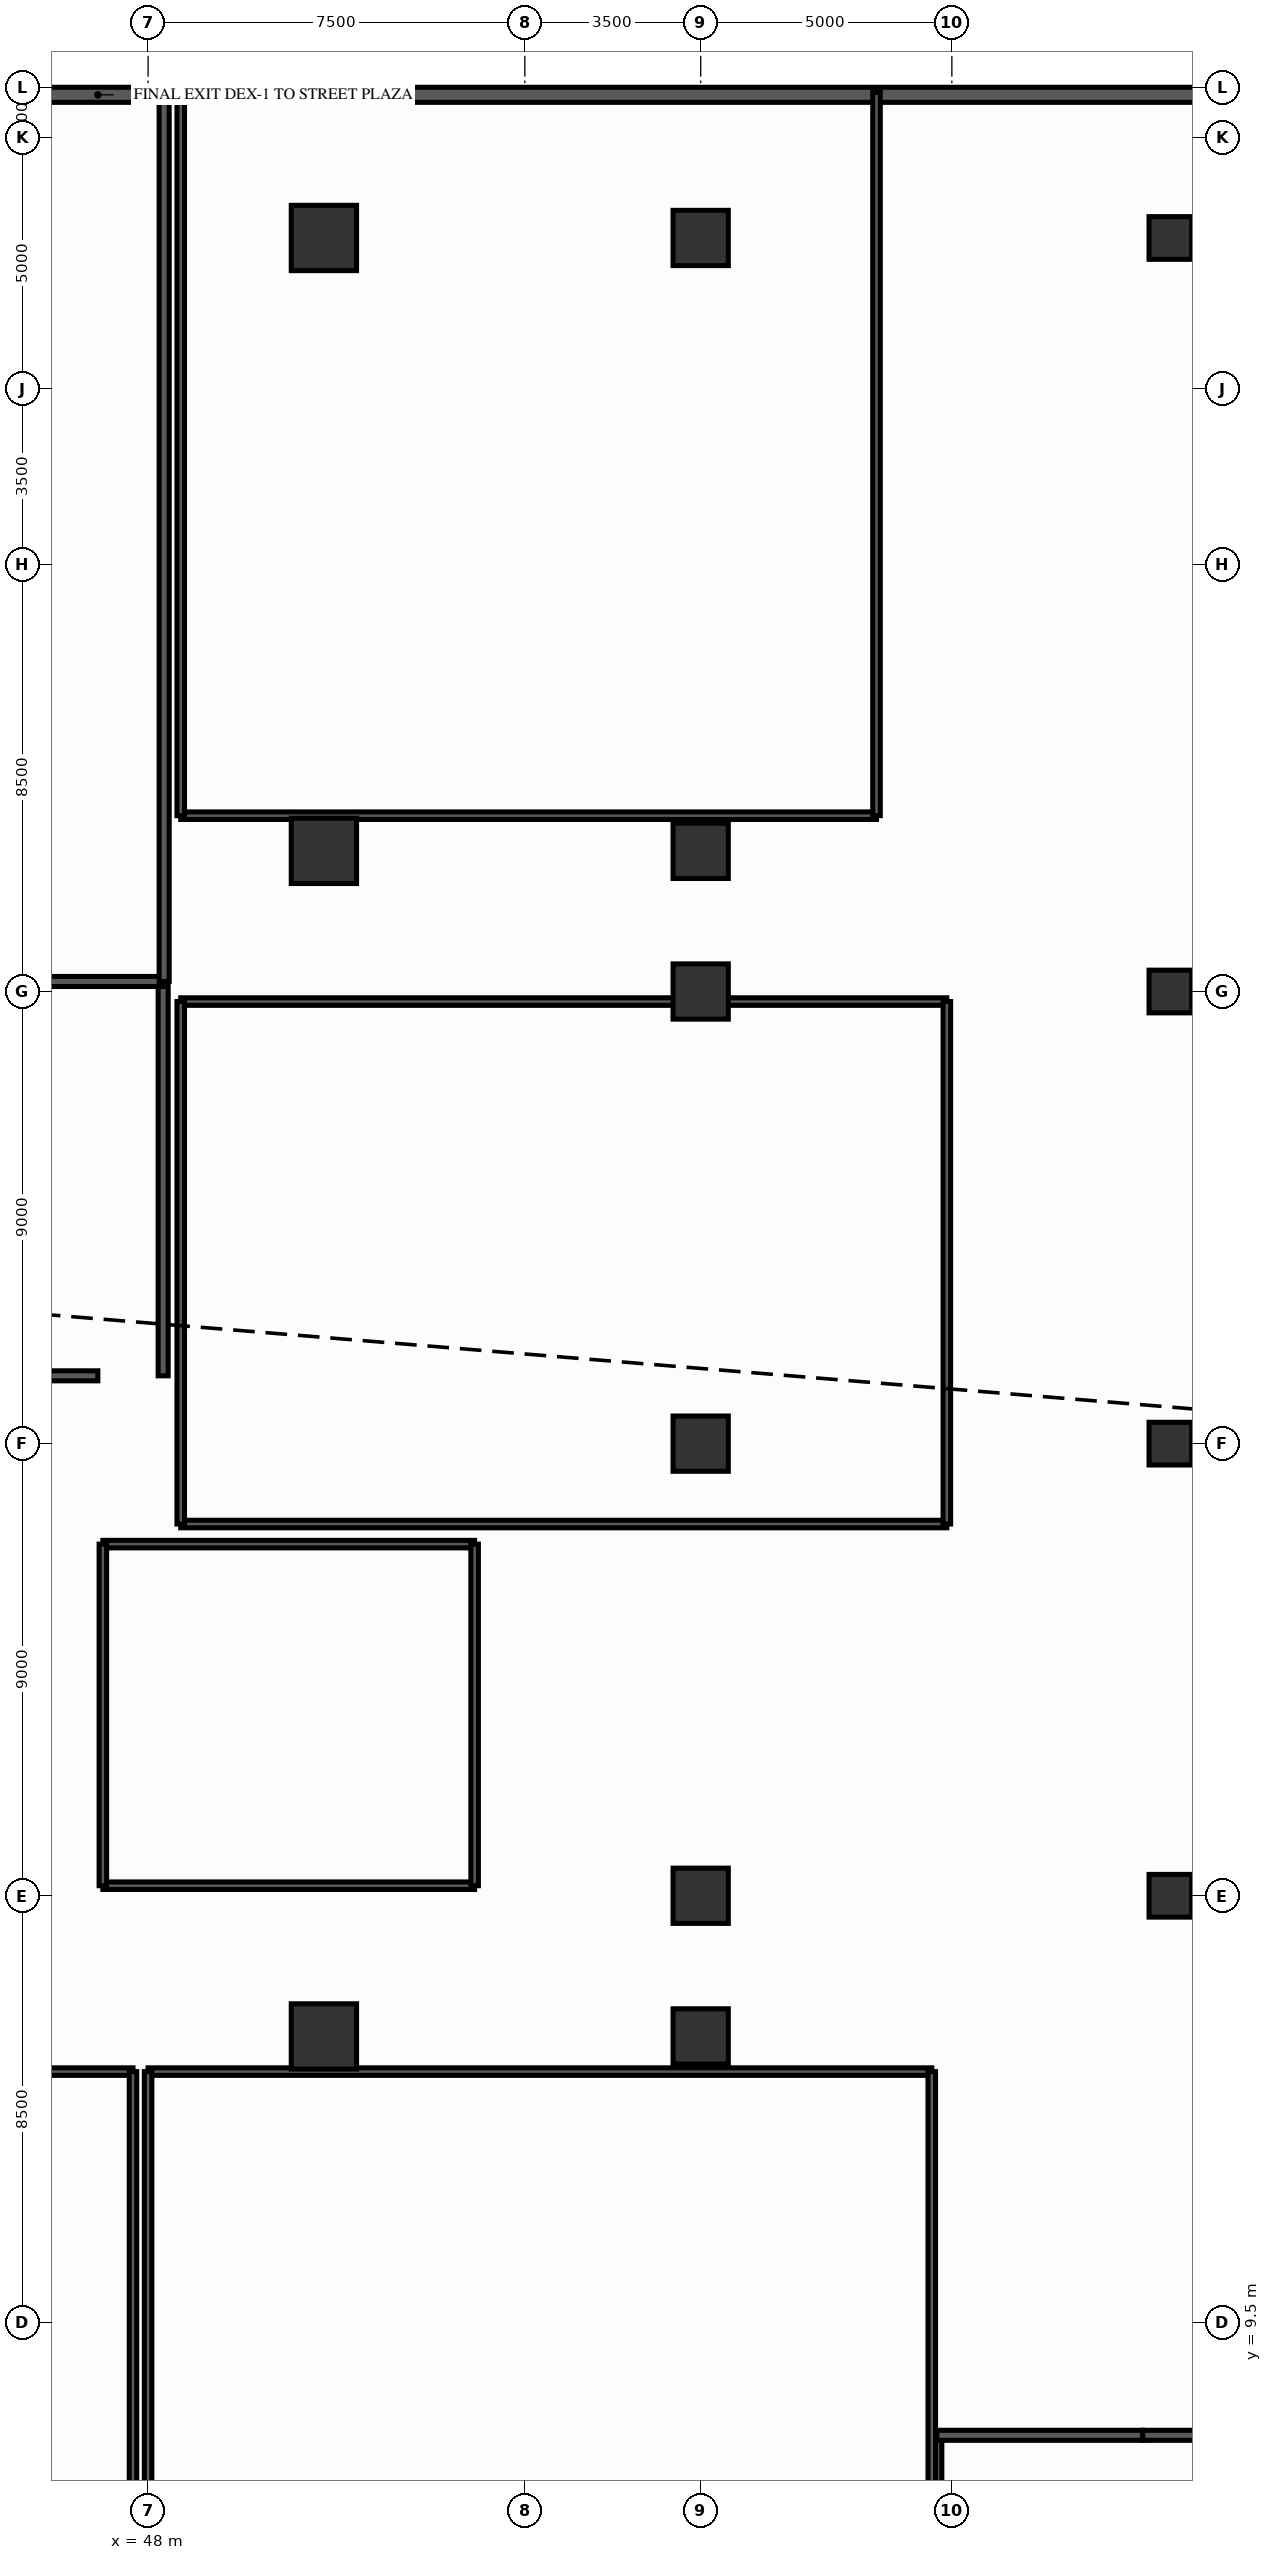
"""IFC4 building model, lengths in metres.
Left out: names, types, materials, properties, quantities, classifications, styles, units other than length and angle.
Written with IfcOpenShell. Run it as: python <this file> out.ifc"""

import sys

from ifc_helpers import new_model, si_unit, direction, frame, frame_2d, origin, origin_2d, place, context, subcontext, project, spatial, rectangle, circle, extrude, source, transform, mapped, element, fill, save


model = new_model("IFC4")
c1 = context("Model", 3, precision=1e-05, world=origin(), true_north=direction((0.0, 1.0)))
c2 = subcontext(c1, "Body", "Model", "MODEL_VIEW")
j1 = project(units=[si_unit("LENGTHUNIT", "METRE"), si_unit("PLANEANGLEUNIT", "RADIAN")], contexts=[c1])
p1 = place(None, origin())
s1 = spatial("IfcSite", under=j1, at=p1, CompositionType="ELEMENT")
p2 = place(p1, origin())
s2 = spatial("IfcBuilding", under=s1, at=p2, CompositionType="ELEMENT")
p3 = place(p2, origin())
s3 = spatial("IfcBuildingStorey", under=s2, at=p3, CompositionType="ELEMENT", Elevation=0.0)
m1 = source(origin(), c2, "Body", "SweptSolid", [
    extrude(circle(Radius=0.425, at=origin_2d()), origin(), (0.0, 0.0, 1.0), 4.2),
])
for number, where, z_axis, x_axis in (
    (1, (68.35, 18.0, 0.0), (0.0, 0.0, 1.0), (1.0, 0.0, 0.0)),
    (2, (68.35, 27.0, 0.0), (0.0, 0.0, 1.0), (1.0, 0.0, 0.0)),
    (3, (68.35, 36.0, 0.0), (0.0, 0.0, 1.0), (1.0, 0.0, 0.0)),
    (4, (68.35, 51.0, 0.0), (0.0, 0.0, 1.0), (1.0, 0.0, 0.0)),
):
    element("IfcColumn", number, at=place(p3, frame(where, z_axis=z_axis, x_axis=x_axis)), inside=s3, PredefinedType="COLUMN", context=c2, shape_type="MappedRepresentation", body=[
        mapped(m1, transform((0.0, 0.0, 0.0), scale=1.0)),
    ])
m2 = source(origin(), c2, "Body", "SweptSolid", [
    extrude(rectangle(XDim=1.1, YDim=1.1, at=origin_2d()), origin(), (0.0, 0.0, 1.0), 4.2),
])
for number, where, z_axis, x_axis in (
    (5, (59.0, 15.2, 0.0), (0.0, 0.0, 1.0), (1.0, 0.0, 0.0)),
    (6, (59.0, 18.0, 0.0), (0.0, 0.0, 1.0), (1.0, 0.0, 0.0)),
    (7, (59.0, 27.0, 0.0), (0.0, 0.0, 1.0), (1.0, 0.0, 0.0)),
    (8, (59.0, 36.0, 0.0), (0.0, 0.0, 1.0), (1.0, 0.0, 0.0)),
    (9, (59.0, 38.8, 0.0), (0.0, 0.0, 1.0), (1.0, 0.0, 0.0)),
    (10, (59.0, 51.0, 0.0), (0.0, 0.0, 1.0), (1.0, 0.0, 0.0)),
):
    element("IfcColumn", number, at=place(p3, frame(where, z_axis=z_axis, x_axis=x_axis)), inside=s3, PredefinedType="COLUMN", context=c2, shape_type="MappedRepresentation", body=[
        mapped(m2, transform((0.0, 0.0, 0.0), scale=1.0)),
    ])
m3 = source(origin(), c2, "Body", "SweptSolid", [
    extrude(rectangle(XDim=1.3, YDim=1.3, at=origin_2d()), origin(), (0.0, 0.0, 1.0), 4.2),
])
for number, where, z_axis, x_axis in (
    (11, (51.5, 15.2, 0.0), (0.0, 0.0, 1.0), (1.0, 0.0, 0.0)),
    (12, (51.5, 38.8, 0.0), (0.0, 0.0, 1.0), (1.0, 0.0, 0.0)),
    (13, (51.5, 51.0, 0.0), (0.0, 0.0, 1.0), (1.0, 0.0, 0.0)),
):
    element("IfcColumn", number, at=place(p3, frame(where, z_axis=z_axis, x_axis=x_axis)), inside=s3, PredefinedType="COLUMN", context=c2, shape_type="MappedRepresentation", body=[
        mapped(m3, transform((0.0, 0.0, 0.0), scale=1.0)),
    ])
p4 = place(p3, frame((45.25, 53.85, 0.0), z_axis=(0.0, 0.0, 1.0), x_axis=(1.0, 0.0, 0.0)))
e14 = element("IfcWall", 14, at=p4, inside=s3, PredefinedType="SOLIDWALL", context=c2, shape_type="SweptSolid", body=[
    extrude(rectangle(XDim=30.75, YDim=0.3, at=frame_2d((15.375, 0.0))), origin(), (0.0, 0.0, 1.0), 3.48),
])
p5 = place(p4, frame((1.05, 0.0, 0.0)))
e15 = element("IfcOpeningElement", 15, at=p5, cuts=e14, PredefinedType="OPENING", context=c2, shape_type="SweptSolid", body=[
    extrude(rectangle(XDim=1.4, YDim=2.2, at=frame_2d((0.7, 1.1))), frame((0.0, 0.162, 0.0), z_axis=(0.0, -1.0, 0.0), x_axis=(1.0, 0.0, 0.0)), (0.0, 0.0, 1.0), 0.324),
])
p6 = place(p3, frame((44.84, 28.35, 0.0), z_axis=(0.0, 0.0, 1.0), x_axis=(1.0, 0.0, 0.0)))
e16 = element("IfcWall", 16, at=p6, inside=s3, PredefinedType="PARTITIONING", context=c2, shape_type="SweptSolid", body=[
    extrude(rectangle(XDim=2.16, YDim=0.2, at=frame_2d((1.08, 0.0))), origin(), (0.0, 0.0, 1.0), 3.92),
])
p7 = place(p6, frame((0.55, 0.0, 0.0)))
e17 = element("IfcOpeningElement", 17, at=p7, cuts=e16, PredefinedType="OPENING", context=c2, shape_type="SweptSolid", body=[
    extrude(rectangle(XDim=1.1, YDim=2.15, at=frame_2d((0.55, 1.075))), frame((0.0, 0.112, 0.0), z_axis=(0.0, -1.0, 0.0), x_axis=(1.0, 0.0, 0.0)), (0.0, 0.0, 1.0), 0.224),
])
p8 = place(p3, frame((48.3, 28.35, 0.0), z_axis=(0.0, 0.0, 1.0), x_axis=(0.0, 1.0, 0.0)))
e18 = element("IfcWall", 18, at=p8, inside=s3, PredefinedType="PARTITIONING", context=c2, shape_type="SweptSolid", body=[
    extrude(rectangle(XDim=7.85, YDim=0.2, at=frame_2d((3.925, 0.0))), origin(), (0.0, 0.0, 1.0), 3.92),
])
p9 = place(p3, frame((44.84, 36.2, 0.0), z_axis=(0.0, 0.0, 1.0), x_axis=(1.0, 0.0, 0.0)))
e19 = element("IfcWall", 19, at=p9, inside=s3, PredefinedType="PARTITIONING", context=c2, shape_type="SweptSolid", body=[
    extrude(rectangle(XDim=3.46, YDim=0.2, at=frame_2d((1.73, 0.0))), origin(), (0.0, 0.0, 1.0), 3.29),
])
p10 = place(p9, frame((1.36, 0.0, 0.0)))
e20 = element("IfcOpeningElement", 20, at=p10, cuts=e19, PredefinedType="OPENING", context=c2, shape_type="SweptSolid", body=[
    extrude(rectangle(XDim=1.1, YDim=2.15, at=frame_2d((0.55, 1.075))), frame((0.0, 0.112, 0.0), z_axis=(0.0, -1.0, 0.0), x_axis=(1.0, 0.0, 0.0)), (0.0, 0.0, 1.0), 0.224),
])
p11 = place(p3, frame((48.32, 36.2, 0.0), z_axis=(0.0, 0.0, 1.0), x_axis=(0.0, 1.0, 0.0)))
e21 = element("IfcWall", 21, at=p11, inside=s3, PredefinedType="PARTITIONING", context=c2, shape_type="SweptSolid", body=[
    extrude(rectangle(XDim=17.65, YDim=0.2, at=frame_2d((8.825, 0.0))), origin(), (0.0, 0.0, 1.0), 3.92),
])
p12 = place(p11, frame((1.65, 0.0, 0.0)))
e22 = element("IfcOpeningElement", 22, at=p12, cuts=e21, PredefinedType="OPENING", context=c2, shape_type="SweptSolid", body=[
    extrude(rectangle(XDim=1.1, YDim=2.15, at=frame_2d((0.55, 1.075))), frame((0.0, 0.112, 0.0), z_axis=(0.0, -1.0, 0.0), x_axis=(1.0, 0.0, 0.0)), (0.0, 0.0, 1.0), 0.224),
])
p13 = place(p3, frame((63.7, 4.39, 0.0), z_axis=(0.0, 0.0, 1.0), x_axis=(0.0, 1.0, 0.0)))
e23 = element("IfcWall", 23, at=p13, inside=s3, PredefinedType="PARTITIONING", context=c2, shape_type="SweptSolid", body=[
    extrude(rectangle(XDim=2.87, YDim=0.2, at=frame_2d((1.435, 0.0))), origin(), (0.0, 0.0, 1.0), 3.92),
])
p14 = place(p3, frame((63.7, 7.26, 0.0), z_axis=(0.0, 0.0, 1.0), x_axis=(1.0, 0.0, 0.0)))
e24 = element("IfcWall", 24, at=p14, inside=s3, PredefinedType="PARTITIONING", context=c2, shape_type="SweptSolid", body=[
    extrude(rectangle(XDim=4.1, YDim=0.2, at=frame_2d((2.05, 0.0))), origin(), (0.0, 0.0, 1.0), 3.92),
])
p15 = place(p14, frame((2.6, 0.0, 0.0), z_axis=(0.0, 0.0, 1.0), x_axis=(-1.0, 0.0, 0.0)))
e25 = element("IfcOpeningElement", 25, at=p15, cuts=e24, PredefinedType="OPENING", context=c2, shape_type="SweptSolid", body=[
    extrude(rectangle(XDim=1.1, YDim=2.15, at=frame_2d((0.55, 1.075))), frame((0.0, 0.112, 0.0), z_axis=(0.0, -1.0, 0.0), x_axis=(1.0, 0.0, 0.0)), (0.0, 0.0, 1.0), 0.224),
])
p16 = place(p3, frame((67.8, 7.26, 0.0), z_axis=(0.0, 0.0, 1.0), x_axis=(1.0, 0.0, 0.0)))
e26 = element("IfcWall", 26, at=p16, inside=s3, PredefinedType="PARTITIONING", context=c2, shape_type="SweptSolid", body=[
    extrude(rectangle(XDim=8.05, YDim=0.2, at=frame_2d((4.025, 0.0))), origin(), (0.0, 0.0, 1.0), 3.92),
])
for number, where, z_axis, x_axis in (
    (27, (47.1, 18.2, 0.0), (0.0, 0.0, 1.0), (1.0, 0.0, 0.0)),
    (28, (47.1, 25.0, 0.0), (0.0, 0.0, 1.0), (1.0, 0.0, 0.0)),
):
    element("IfcWall", number, at=place(p3, frame(where, z_axis=z_axis, x_axis=x_axis)), inside=s3, PredefinedType="PARTITIONING", context=c2, shape_type="SweptSolid", body=[
        extrude(rectangle(XDim=7.4, YDim=0.15, at=frame_2d((3.7, 0.0))), origin(), (0.0, 0.0, 1.0), 3.92),
    ])
p17 = place(p3, frame((47.1, 18.2, 0.0), z_axis=(0.0, 0.0, 1.0), x_axis=(0.0, 1.0, 0.0)))
e29 = element("IfcWall", 29, at=p17, inside=s3, PredefinedType="PARTITIONING", context=c2, shape_type="SweptSolid", body=[
    extrude(rectangle(XDim=6.8, YDim=0.15, at=frame_2d((3.4, 0.0))), origin(), (0.0, 0.0, 1.0), 3.92),
])
p18 = place(p17, frame((2.694, 0.0, 0.0)))
e30 = element("IfcOpeningElement", 30, at=p18, cuts=e29, PredefinedType="OPENING", context=c2, shape_type="SweptSolid", body=[
    extrude(rectangle(XDim=1.1, YDim=2.15, at=frame_2d((0.55, 1.075))), frame((0.0, 0.087, 0.0), z_axis=(0.0, -1.0, 0.0), x_axis=(1.0, 0.0, 0.0)), (0.0, 0.0, 1.0), 0.174),
])
p19 = place(p3, frame((54.5, 18.2, 0.0), z_axis=(0.0, 0.0, 1.0), x_axis=(0.0, 1.0, 0.0)))
e31 = element("IfcWall", 31, at=p19, inside=s3, PredefinedType="PARTITIONING", context=c2, shape_type="SweptSolid", body=[
    extrude(rectangle(XDim=6.8, YDim=0.15, at=frame_2d((3.4, 0.0))), origin(), (0.0, 0.0, 1.0), 3.92),
])
p20 = place(p3, frame((28.3, 14.5, 0.0), z_axis=(0.0, 0.0, 1.0), x_axis=(1.0, 0.0, 0.0)))
e32 = element("IfcWall", 32, at=p20, inside=s3, PredefinedType="PARTITIONING", context=c2, shape_type="SweptSolid", body=[
    extrude(rectangle(XDim=19.4, YDim=0.15, at=frame_2d((9.7, 0.0))), origin(), (0.0, 0.0, 1.0), 3.92),
])
p21 = place(p20, frame((6.434, 0.0, 0.0)))
e33 = element("IfcOpeningElement", 33, at=p21, cuts=e32, PredefinedType="OPENING", context=c2, shape_type="SweptSolid", body=[
    extrude(rectangle(XDim=1.0, YDim=2.1, at=frame_2d((0.5, 1.05))), frame((0.0, 0.087, 0.0), z_axis=(0.0, -1.0, 0.0), x_axis=(1.0, 0.0, 0.0)), (0.0, 0.0, 1.0), 0.174),
])
p22 = place(p3, frame((47.7, 0.1, 0.0), z_axis=(0.0, 0.0, 1.0), x_axis=(0.0, 1.0, 0.0)))
e34 = element("IfcWall", 34, at=p22, inside=s3, PredefinedType="PARTITIONING", context=c2, shape_type="SweptSolid", body=[
    extrude(rectangle(XDim=14.4, YDim=0.15, at=frame_2d((7.2, 0.0))), origin(), (0.0, 0.0, 1.0), 3.92),
])
p23 = place(p3, frame((48.65, 39.5, 0.0), z_axis=(0.0, 0.0, 1.0), x_axis=(1.0, 0.0, 0.0)))
e35 = element("IfcWall", 35, at=p23, inside=s3, PredefinedType="PARTITIONING", context=c2, shape_type="SweptSolid", body=[
    extrude(rectangle(XDim=13.85, YDim=0.15, at=frame_2d((6.925, 0.0))), origin(), (0.0, 0.0, 1.0), 3.92),
])
p24 = place(p23, frame((6.045, 0.0, 0.0)))
e36 = element("IfcOpeningElement", 36, at=p24, cuts=e35, PredefinedType="OPENING", context=c2, shape_type="SweptSolid", body=[
    extrude(rectangle(XDim=1.0, YDim=2.1, at=frame_2d((0.5, 1.05))), frame((0.0, 0.087, 0.0), z_axis=(0.0, -1.0, 0.0), x_axis=(1.0, 0.0, 0.0)), (0.0, 0.0, 1.0), 0.174),
])
for number, where, z_axis, x_axis in (
    (37, (48.65, 39.5, 0.0), (0.0, 0.0, 1.0), (0.0, 1.0, 0.0)),
    (38, (62.5, 39.5, 0.0), (0.0, 0.0, 1.0), (0.0, 1.0, 0.0)),
):
    element("IfcWall", number, at=place(p3, frame(where, z_axis=z_axis, x_axis=x_axis)), inside=s3, PredefinedType="PARTITIONING", context=c2, shape_type="SweptSolid", body=[
        extrude(rectangle(XDim=14.4, YDim=0.15, at=frame_2d((7.2, 0.0))), origin(), (0.0, 0.0, 1.0), 3.92),
    ])
p25 = place(p3, frame((48.0, 14.5, 0.0), z_axis=(0.0, 0.0, 1.0), x_axis=(1.0, 0.0, 0.0)))
e39 = element("IfcWall", 39, at=p25, inside=s3, PredefinedType="PARTITIONING", context=c2, shape_type="SweptSolid", body=[
    extrude(rectangle(XDim=15.6, YDim=0.15, at=frame_2d((7.8, 0.0))), origin(), (0.0, 0.0, 1.0), 3.92),
])
p26 = place(p25, frame((6.865, 0.0, 0.0)))
e40 = element("IfcOpeningElement", 40, at=p26, cuts=e39, PredefinedType="OPENING", context=c2, shape_type="SweptSolid", body=[
    extrude(rectangle(XDim=1.0, YDim=2.1, at=frame_2d((0.5, 1.05))), frame((0.0, 0.087, 0.0), z_axis=(0.0, -1.0, 0.0), x_axis=(1.0, 0.0, 0.0)), (0.0, 0.0, 1.0), 0.174),
])
for number, where, z_axis, x_axis in (
    (41, (48.0, 0.1, 0.0), (0.0, 0.0, 1.0), (0.0, 1.0, 0.0)),
    (42, (63.6, 0.1, 0.0), (0.0, 0.0, 1.0), (0.0, 1.0, 0.0)),
):
    element("IfcWall", number, at=place(p3, frame(where, z_axis=z_axis, x_axis=x_axis)), inside=s3, PredefinedType="PARTITIONING", context=c2, shape_type="SweptSolid", body=[
        extrude(rectangle(XDim=14.4, YDim=0.15, at=frame_2d((7.2, 0.0))), origin(), (0.0, 0.0, 1.0), 3.92),
    ])
for number, where, z_axis, x_axis in (
    (43, (48.65, 25.4, 0.0), (0.0, 0.0, 1.0), (1.0, 0.0, 0.0)),
    (44, (48.65, 35.8, 0.0), (0.0, 0.0, 1.0), (1.0, 0.0, 0.0)),
):
    element("IfcWall", number, at=place(p3, frame(where, z_axis=z_axis, x_axis=x_axis)), inside=s3, PredefinedType="PARTITIONING", context=c2, shape_type="SweptSolid", body=[
        extrude(rectangle(XDim=15.25, YDim=0.15, at=frame_2d((7.625, 0.0))), origin(), (0.0, 0.0, 1.0), 3.92),
    ])
p27 = place(p3, frame((48.65, 25.4, 0.0), z_axis=(0.0, 0.0, 1.0), x_axis=(0.0, 1.0, 0.0)))
e45 = element("IfcWall", 45, at=p27, inside=s3, PredefinedType="PARTITIONING", context=c2, shape_type="SweptSolid", body=[
    extrude(rectangle(XDim=10.4, YDim=0.15, at=frame_2d((5.2, 0.0))), origin(), (0.0, 0.0, 1.0), 3.92),
])
p28 = place(p3, frame((63.9, 25.4, 0.0), z_axis=(0.0, 0.0, 1.0), x_axis=(0.0, 1.0, 0.0)))
e46 = element("IfcWall", 46, at=p28, inside=s3, PredefinedType="PARTITIONING", context=c2, shape_type="SweptSolid", body=[
    extrude(rectangle(XDim=10.4, YDim=0.15, at=frame_2d((5.2, 0.0))), origin(), (0.0, 0.0, 1.0), 3.92),
])
p29 = place(p28, frame((4.428, 0.0, 0.0)))
e47 = element("IfcOpeningElement", 47, at=p29, cuts=e46, PredefinedType="OPENING", context=c2, shape_type="SweptSolid", body=[
    extrude(rectangle(XDim=1.0, YDim=2.1, at=frame_2d((0.5, 1.05))), frame((0.0, 0.087, 0.0), z_axis=(0.0, -1.0, 0.0), x_axis=(1.0, 0.0, 0.0)), (0.0, 0.0, 1.0), 0.174),
])
m4 = source(origin(), c2, "Body", "SweptSolid", [
    extrude(rectangle(XDim=1.4, YDim=2.2, at=frame_2d((0.7, 1.1))), frame((0.0, 0.025, 0.0), z_axis=(0.0, -1.0, 0.0), x_axis=(1.0, 0.0, 0.0)), (0.0, 0.0, 1.0), 0.05),
])
p30 = place(p5, origin())
e48 = element("IfcDoor", 48, at=p30, inside=s3, OperationType="SINGLE_SWING_RIGHT", PredefinedType="DOOR", context=c2, shape_type="MappedRepresentation", body=[
    mapped(m4, transform((0.0, 0.0, 0.0), scale=1.0)),
])
fill(e15, e48)
m5 = source(origin(), c2, "Body", "SweptSolid", [
    extrude(rectangle(XDim=1.1, YDim=2.15, at=frame_2d((0.55, 1.075))), frame((0.0, 0.025, 0.0), z_axis=(0.0, -1.0, 0.0), x_axis=(1.0, 0.0, 0.0)), (0.0, 0.0, 1.0), 0.05),
])
p31 = place(p7, origin())
e49 = element("IfcDoor", 49, at=p31, inside=s3, OperationType="SINGLE_SWING_LEFT", PredefinedType="DOOR", context=c2, shape_type="MappedRepresentation", body=[
    mapped(m5, transform((0.0, 0.0, 0.0), scale=1.0)),
])
fill(e17, e49)
p32 = place(p10, origin())
e50 = element("IfcDoor", 50, at=p32, inside=s3, OperationType="SINGLE_SWING_RIGHT", PredefinedType="DOOR", context=c2, shape_type="MappedRepresentation", body=[
    mapped(m5, transform((0.0, 0.0, 0.0), scale=1.0)),
])
fill(e20, e50)
p33 = place(p12, origin())
e51 = element("IfcDoor", 51, at=p33, inside=s3, OperationType="SINGLE_SWING_LEFT", PredefinedType="DOOR", context=c2, shape_type="MappedRepresentation", body=[
    mapped(m5, transform((0.0, 0.0, 0.0), scale=1.0)),
])
fill(e22, e51)
p34 = place(p15, origin())
e52 = element("IfcDoor", 52, at=p34, inside=s3, OperationType="SINGLE_SWING_RIGHT", PredefinedType="DOOR", context=c2, shape_type="MappedRepresentation", body=[
    mapped(m5, transform((0.0, 0.0, 0.0), scale=1.0)),
])
fill(e25, e52)
p35 = place(p18, origin())
e53 = element("IfcDoor", 53, at=p35, inside=s3, OperationType="SINGLE_SWING_LEFT", PredefinedType="DOOR", context=c2, shape_type="MappedRepresentation", body=[
    mapped(m5, transform((0.0, 0.0, 0.0), scale=1.0)),
])
fill(e30, e53)
m6 = source(origin(), c2, "Body", "SweptSolid", [
    extrude(rectangle(XDim=1.0, YDim=2.1, at=frame_2d((0.5, 1.05))), frame((0.0, 0.025, 0.0), z_axis=(0.0, -1.0, 0.0), x_axis=(1.0, 0.0, 0.0)), (0.0, 0.0, 1.0), 0.05),
])
p36 = place(p24, origin())
e54 = element("IfcDoor", 54, at=p36, inside=s3, OperationType="SINGLE_SWING_RIGHT", PredefinedType="DOOR", context=c2, shape_type="MappedRepresentation", body=[
    mapped(m6, transform((0.0, 0.0, 0.0), scale=1.0)),
])
fill(e36, e54)
p37 = place(p26, origin())
e55 = element("IfcDoor", 55, at=p37, inside=s3, OperationType="SINGLE_SWING_LEFT", PredefinedType="DOOR", context=c2, shape_type="MappedRepresentation", body=[
    mapped(m6, transform((0.0, 0.0, 0.0), scale=1.0)),
])
fill(e40, e55)
p38 = place(p29, origin())
e56 = element("IfcDoor", 56, at=p38, inside=s3, OperationType="SINGLE_SWING_RIGHT", PredefinedType="DOOR", context=c2, shape_type="MappedRepresentation", body=[
    mapped(m6, transform((0.0, 0.0, 0.0), scale=1.0)),
])
fill(e47, e56)
save(model, sys.argv[1])
